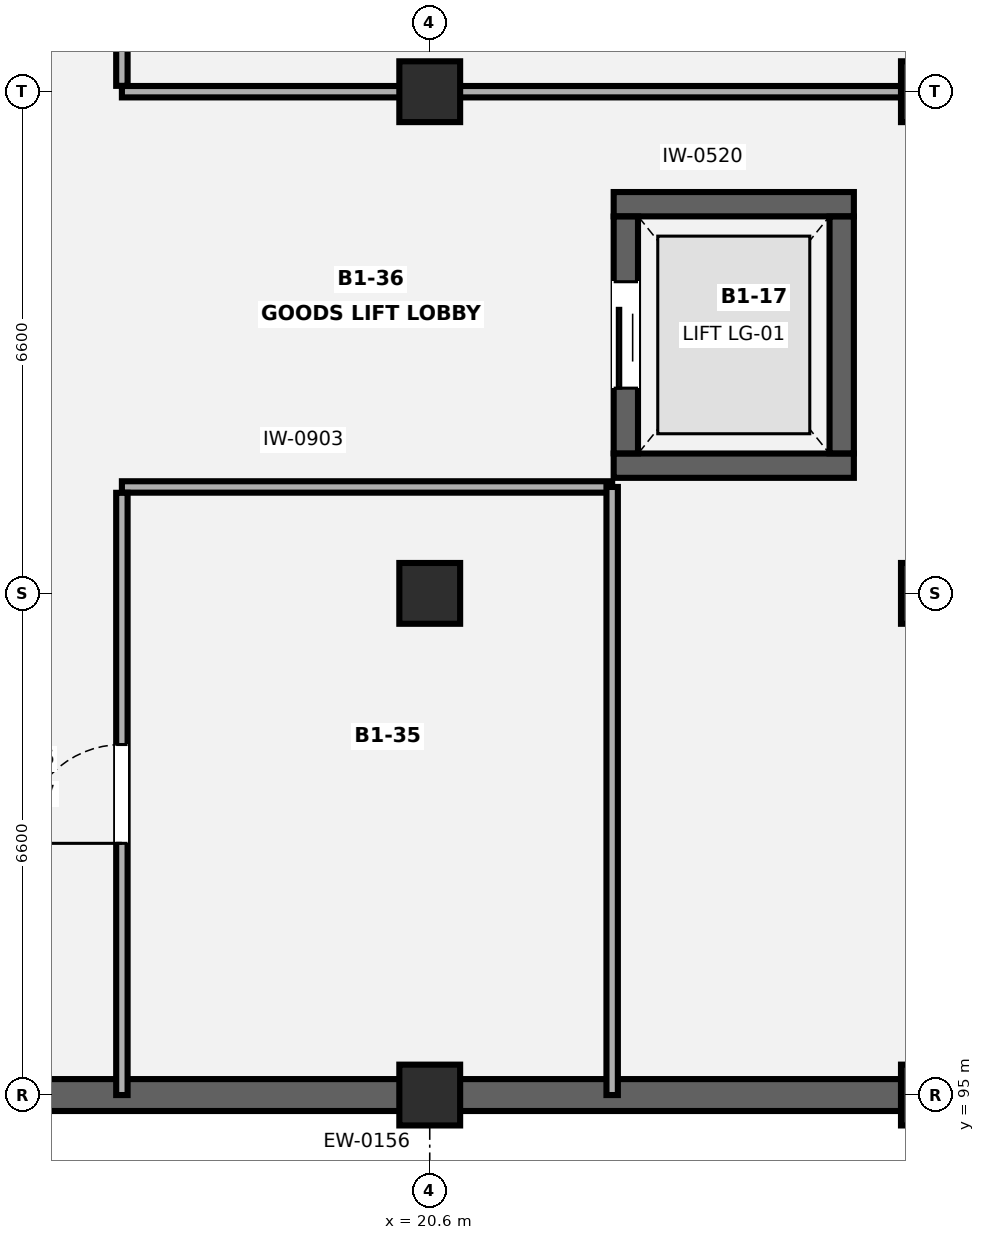
"""IFC4 building model, lengths in metres.
Left out: names, types, materials, properties, quantities, classifications, styles, units other than length and angle.
Written with IfcOpenShell. Run it as: python <this file> out.ifc"""

import sys

from ifc_helpers import new_model, si_unit, direction, frame, frame_2d, origin, origin_2d, place, context, subcontext, project, spatial, rectangle, extrude, element, fill, save


model = new_model("IFC4")
c1 = context("Model", 3, precision=1e-05, world=origin(), true_north=direction((0.0, 1.0)))
c2 = subcontext(c1, "Body", "Model", "MODEL_VIEW")
j1 = project(units=[si_unit("LENGTHUNIT", "METRE"), si_unit("PLANEANGLEUNIT", "RADIAN")], contexts=[c1])
p1 = place(None, origin())
s1 = spatial("IfcSite", under=j1, at=p1, CompositionType="ELEMENT")
p2 = place(p1, origin())
s2 = spatial("IfcBuilding", under=s1, at=p2, CompositionType="ELEMENT")
p3 = place(p2, frame((0.0, 0.0, -4.2)))
s3 = spatial("IfcBuildingStorey", under=s2, at=p3, CompositionType="ELEMENT", Elevation=-4.2)
for number, where, z_axis, x_axis in (
    (1, (20.6, 95.0, 0.0), (0.0, 0.0, 1.0), (1.0, 0.0, 0.0)),
    (2, (20.6, 101.6, 0.0), (0.0, 0.0, 1.0), (1.0, 0.0, 0.0)),
    (3, (20.6, 108.2, 0.0), (0.0, 0.0, 1.0), (1.0, 0.0, 0.0)),
    (4, (27.2, 95.0, 0.0), (0.0, 0.0, 1.0), (1.0, 0.0, 0.0)),
    (5, (27.2, 101.6, 0.0), (0.0, 0.0, 1.0), (1.0, 0.0, 0.0)),
    (6, (27.2, 108.2, 0.0), (0.0, 0.0, 1.0), (1.0, 0.0, 0.0)),
):
    element("IfcColumn", number, at=place(p3, frame(where, z_axis=z_axis, x_axis=x_axis)), inside=s3, PredefinedType="COLUMN", context=c2, shape_type="SweptSolid", body=[
        extrude(rectangle(XDim=0.8, YDim=0.8, at=origin_2d()), origin(), (0.0, 0.0, 1.0), 4.2),
    ])
p4 = place(p3, frame((26.802, 95.0, 0.0), z_axis=(0.0, 0.0, 1.0), x_axis=(-1.0, 0.0, 0.0)))
e7 = element("IfcWall", 7, at=p4, inside=s3, PredefinedType="USERDEFINED", context=c2, shape_type="SweptSolid", body=[
    extrude(rectangle(XDim=19.004, YDim=0.42, at=frame_2d((9.502, 0.0))), origin(), (0.0, 0.0, 1.0), 3.85),
])
for number, where, z_axis, x_axis in (
    (8, (23.02, 103.28, 0.0), (0.0, 0.0, 1.0), (1.0, 0.0, 0.0)),
    (9, (23.02, 106.72, 0.0), (0.0, 0.0, 1.0), (1.0, 0.0, 0.0)),
):
    element("IfcWall", number, at=place(p3, frame(where, z_axis=z_axis, x_axis=x_axis)), inside=s3, PredefinedType="SHEAR", context=c2, shape_type="SweptSolid", body=[
        extrude(rectangle(XDim=3.16, YDim=0.32, at=frame_2d((1.58, 0.0))), origin(), (0.0, 0.0, 1.0), 3.85),
    ])
p5 = place(p3, frame((23.18, 103.442, 0.0), z_axis=(0.0, 0.0, 1.0), x_axis=(0.0, 1.0, 0.0)))
e10 = element("IfcWall", 10, at=p5, inside=s3, PredefinedType="SHEAR", context=c2, shape_type="SweptSolid", body=[
    extrude(rectangle(XDim=3.116, YDim=0.32, at=frame_2d((1.558, 0.0))), origin(), (0.0, 0.0, 1.0), 3.85),
])
p6 = place(p5, frame((0.858, 0.0, 0.0)))
e11 = element("IfcOpeningElement", 11, at=p6, cuts=e10, PredefinedType="OPENING", context=c2, shape_type="SweptSolid", body=[
    extrude(rectangle(XDim=1.4, YDim=2.25, at=frame_2d((0.7, 1.125))), frame((0.0, 0.17, 0.0), z_axis=(0.0, -1.0, 0.0), x_axis=(1.0, 0.0, 0.0)), (0.0, 0.0, 1.0), 0.34),
])
p7 = place(p3, frame((26.02, 103.442, 0.0), z_axis=(0.0, 0.0, 1.0), x_axis=(0.0, 1.0, 0.0)))
e12 = element("IfcWall", 12, at=p7, inside=s3, PredefinedType="SHEAR", context=c2, shape_type="SweptSolid", body=[
    extrude(rectangle(XDim=3.116, YDim=0.32, at=frame_2d((1.558, 0.0))), origin(), (0.0, 0.0, 1.0), 3.85),
])
p8 = place(p3, frame((16.55, 103.0, 0.0), z_axis=(0.0, 0.0, 1.0), x_axis=(1.0, 0.0, 0.0)))
e13 = element("IfcWall", 13, at=p8, inside=s3, PredefinedType="PARTITIONING", context=c2, shape_type="SweptSolid", body=[
    extrude(rectangle(XDim=6.45, YDim=0.15, at=frame_2d((3.225, 0.0))), origin(), (0.0, 0.0, 1.0), 3.85),
])
p9 = place(p3, frame((16.55, 95.0, 0.0), z_axis=(0.0, 0.0, 1.0), x_axis=(0.0, 1.0, 0.0)))
e14 = element("IfcWall", 14, at=p9, inside=s3, PredefinedType="PARTITIONING", context=c2, shape_type="SweptSolid", body=[
    extrude(rectangle(XDim=7.923, YDim=0.15, at=frame_2d((3.961, 0.0))), origin(), (0.0, 0.0, 1.0), 3.85),
])
p10 = place(p9, frame((3.312, 0.0, 0.0)))
e15 = element("IfcOpeningElement", 15, at=p10, cuts=e14, PredefinedType="OPENING", context=c2, shape_type="SweptSolid", body=[
    extrude(rectangle(XDim=1.3, YDim=2.2, at=frame_2d((0.65, 1.1))), frame((0.0, 0.085, 0.0), z_axis=(0.0, -1.0, 0.0), x_axis=(1.0, 0.0, 0.0)), (0.0, 0.0, 1.0), 0.17),
])
p11 = place(p3, frame((23.0, 95.0, 0.0), z_axis=(0.0, 0.0, 1.0), x_axis=(0.0, 1.0, 0.0)))
e16 = element("IfcWall", 16, at=p11, inside=s3, PredefinedType="PARTITIONING", context=c2, shape_type="SweptSolid", body=[
    extrude(rectangle(XDim=8.0, YDim=0.15, at=frame_2d((4.0, 0.0))), origin(), (0.0, 0.0, 1.0), 3.85),
])
p12 = place(p3, frame((16.55, 108.2, 0.0), z_axis=(0.0, 0.0, 1.0), x_axis=(1.0, 0.0, 0.0)))
e17 = element("IfcWall", 17, at=p12, inside=s3, PredefinedType="PARTITIONING", context=c2, shape_type="SweptSolid", body=[
    extrude(rectangle(XDim=10.458, YDim=0.15, at=frame_2d((5.229, 0.0))), origin(), (0.0, 0.0, 1.0), 2.435),
])
p13 = place(p3, frame((16.55, 108.277, 0.0), z_axis=(0.0, 0.0, 1.0), x_axis=(0.0, 1.0, 0.0)))
e18 = element("IfcWall", 18, at=p13, inside=s3, PredefinedType="PARTITIONING", context=c2, shape_type="SweptSolid", body=[
    extrude(rectangle(XDim=13.046, YDim=0.15, at=frame_2d((6.523, 0.0))), origin(), (0.0, 0.0, 1.0), 3.85),
])
p14 = place(p13, frame((5.873, 0.0, 0.0)))
e19 = element("IfcOpeningElement", 19, at=p14, cuts=e18, PredefinedType="OPENING", context=c2, shape_type="SweptSolid", body=[
    extrude(rectangle(XDim=1.3, YDim=2.2, at=frame_2d((0.65, 1.1))), frame((0.0, 0.085, 0.0), z_axis=(0.0, -1.0, 0.0), x_axis=(1.0, 0.0, 0.0)), (0.0, 0.0, 1.0), 0.17),
])
p15 = place(p6, origin())
e20 = element("IfcDoor", 20, at=p15, inside=s3, OperationType="DOUBLE_DOOR_SLIDING", PredefinedType="DOOR", context=c2, shape_type="SweptSolid", body=[
    extrude(rectangle(XDim=1.4, YDim=2.25, at=frame_2d((0.7, 1.125))), frame((0.0, 0.025, 0.0), z_axis=(0.0, -1.0, 0.0), x_axis=(1.0, 0.0, 0.0)), (0.0, 0.0, 1.0), 0.05),
])
fill(e11, e20)
p16 = place(p10, origin())
e21 = element("IfcDoor", 21, at=p16, inside=s3, OperationType="SINGLE_SWING_LEFT", PredefinedType="DOOR", context=c2, shape_type="SweptSolid", body=[
    extrude(rectangle(XDim=1.3, YDim=2.2, at=frame_2d((0.65, 1.1))), frame((0.0, 0.025, 0.0), z_axis=(0.0, -1.0, 0.0), x_axis=(1.0, 0.0, 0.0)), (0.0, 0.0, 1.0), 0.05),
])
fill(e15, e21)
save(model, sys.argv[1])
